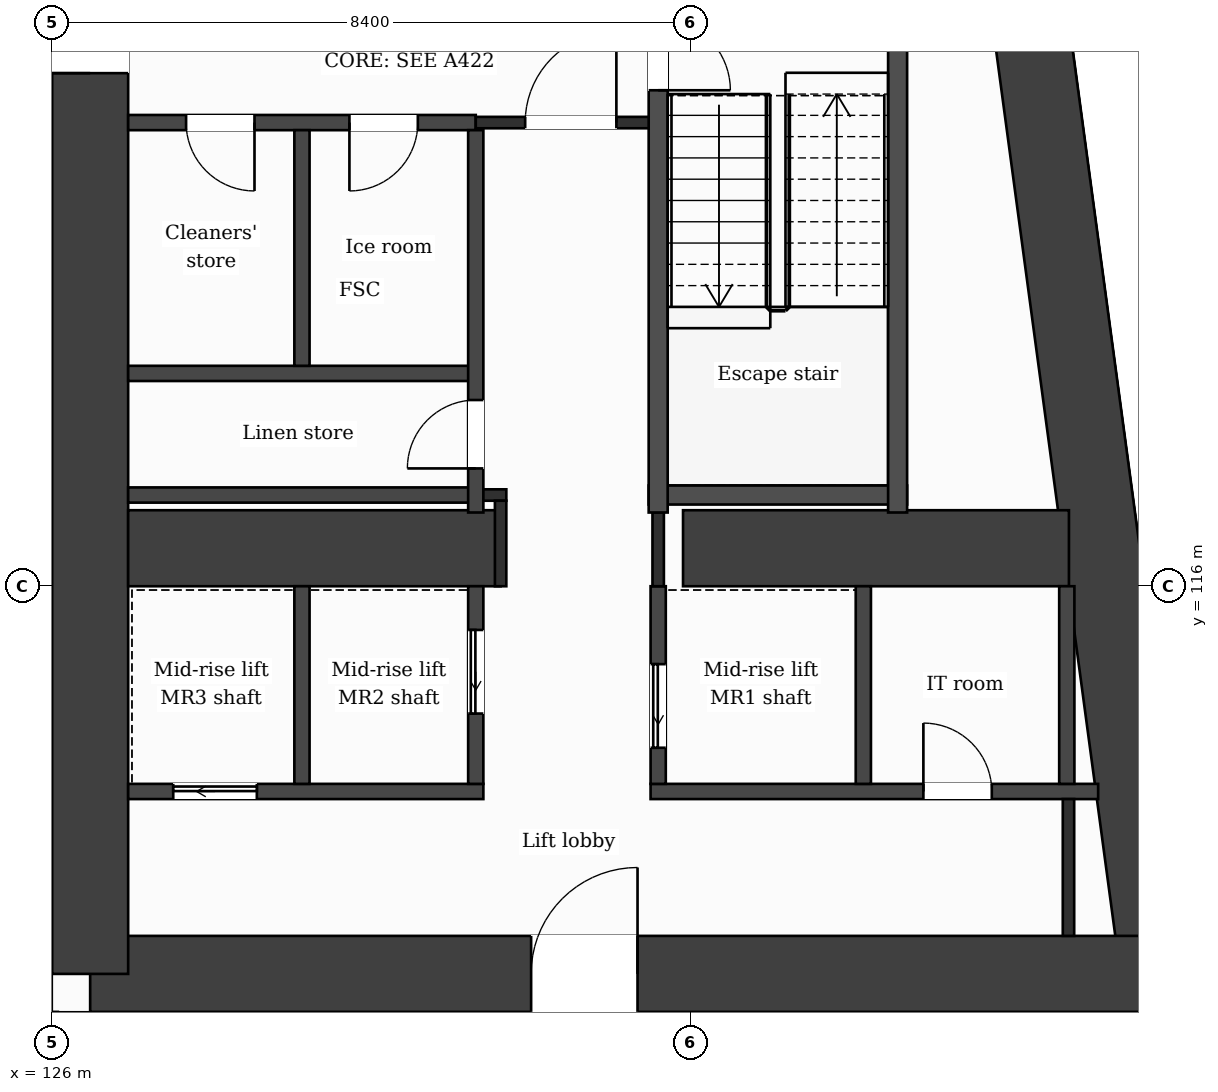
"""IFC4 building model, lengths in metres.
Left out: names, types, materials, properties, quantities, classifications, styles, units other than length and angle.
Written with IfcOpenShell. Run it as: python <this file> out.ifc"""

import sys

from ifc_helpers import new_model, si_unit, direction, frame, frame_2d, origin, place, context, subcontext, project, spatial, rectangle, extrude, element, fill, save


model = new_model("IFC4")
c1 = context("Model", 3, precision=1e-05, world=origin(), true_north=direction((0.0, 1.0)))
c2 = subcontext(c1, "Body", "Model", "MODEL_VIEW")
j1 = project(units=[si_unit("LENGTHUNIT", "METRE"), si_unit("PLANEANGLEUNIT", "RADIAN")], contexts=[c1])
p1 = place(None, origin())
s1 = spatial("IfcSite", under=j1, at=p1, CompositionType="ELEMENT")
p2 = place(p1, origin())
s2 = spatial("IfcBuilding", under=s1, at=p2, CompositionType="ELEMENT")
p3 = place(p2, frame((0.0, 0.0, 94.7)))
s3 = spatial("IfcBuildingStorey", under=s2, at=p3, CompositionType="ELEMENT", Elevation=94.7)
p4 = place(p3, frame((137.732, 131.9, 0.0), z_axis=(0.0, 0.0, 1.0), x_axis=(0.133411141623, -0.991060778808, 0.0)))
e1 = element("IfcWall", 1, at=p4, inside=s3, PredefinedType="SHEAR", context=c2, shape_type="SweptSolid", body=[
    extrude(rectangle(XDim=21.189, YDim=1.0, at=frame_2d((10.595, 0.0))), origin(), (0.0, 0.0, 1.0), 3.7),
])
p5 = place(p3, frame((140.559, 110.9, 0.0), z_axis=(0.0, 0.0, 1.0), x_axis=(-1.0, 0.0, 0.0)))
e2 = element("IfcWall", 2, at=p5, inside=s3, PredefinedType="SHEAR", context=c2, shape_type="SweptSolid", body=[
    extrude(rectangle(XDim=14.059, YDim=1.0, at=frame_2d((7.029, 0.0))), origin(), (0.0, 0.0, 1.0), 3.7),
])
p6 = place(p5, frame((6.858, 0.0, 0.0)))
e3 = element("IfcOpeningElement", 3, at=p6, cuts=e2, PredefinedType="OPENING", context=c2, shape_type="SweptSolid", body=[
    extrude(rectangle(XDim=1.4, YDim=2.1, at=frame_2d((0.7, 1.05))), frame((0.0, 0.51, 0.0), z_axis=(0.0, -1.0, 0.0), x_axis=(1.0, 0.0, 0.0)), (0.0, 0.0, 1.0), 1.02),
])
p7 = place(p3, frame((126.5, 110.9, 0.0), z_axis=(0.0, 0.0, 1.0), x_axis=(0.0, 1.0, 0.0)))
e4 = element("IfcWall", 4, at=p7, inside=s3, PredefinedType="SHEAR", context=c2, shape_type="SweptSolid", body=[
    extrude(rectangle(XDim=21.0, YDim=1.0, at=frame_2d((10.5, 0.0))), origin(), (0.0, 0.0, 1.0), 3.7),
])
p8 = place(p7, frame((11.85, 0.0, 0.0)))
e5 = element("IfcOpeningElement", 5, at=p8, cuts=e4, PredefinedType="OPENING", context=c2, shape_type="SweptSolid", body=[
    extrude(rectangle(XDim=1.4, YDim=2.1, at=frame_2d((0.7, 1.05))), frame((0.0, 0.51, 0.0), z_axis=(0.0, -1.0, 0.0), x_axis=(1.0, 0.0, 0.0)), (0.0, 0.0, 1.0), 1.02),
])
p9 = place(p3, frame((127.0, 116.5, 0.0), z_axis=(0.0, 0.0, 1.0), x_axis=(1.0, 0.0, 0.0)))
e6 = element("IfcWall", 6, at=p9, inside=s3, PredefinedType="SHEAR", context=c2, shape_type="SweptSolid", body=[
    extrude(rectangle(XDim=4.9, YDim=1.0, at=frame_2d((2.45, 0.0))), origin(), (0.0, 0.0, 1.0), 3.7),
])
p10 = place(p3, frame((134.3, 116.5, 0.0), z_axis=(0.0, 0.0, 1.0), x_axis=(1.0, 0.0, 0.0)))
e7 = element("IfcWall", 7, at=p10, inside=s3, PredefinedType="SHEAR", context=c2, shape_type="SweptSolid", body=[
    extrude(rectangle(XDim=5.077, YDim=1.0, at=frame_2d((2.539, 0.0))), origin(), (0.0, 0.0, 1.0), 3.7),
])
p11 = place(p3, frame((140.348, 103.85, 0.0), z_axis=(0.0, 0.0, 1.0), x_axis=(-0.133431549479, 0.991058031401, 0.0)))
e8 = element("IfcWall", 8, at=p11, inside=s3, PredefinedType="SOLIDWALL", context=c2, shape_type="SweptSolid", body=[
    extrude(rectangle(XDim=6.609, YDim=0.3, at=frame_2d((3.304, 0.0))), origin(), (0.0, 0.0, 1.0), 3.38),
])
p12 = place(p11, frame((0.737, 0.0, 0.9)))
e9 = element("IfcOpeningElement", 9, at=p12, cuts=e8, PredefinedType="OPENING", context=c2, shape_type="SweptSolid", body=[
    extrude(rectangle(XDim=1.2, YDim=2.1, at=frame_2d((0.6, 1.05))), frame((0.0, 0.16, 0.0), z_axis=(0.0, -1.0, 0.0), x_axis=(1.0, 0.0, 0.0)), (0.0, 0.0, 1.0), 0.32),
])
p13 = place(p11, frame((3.991, 0.0, 0.0)))
e10 = element("IfcOpeningElement", 10, at=p13, cuts=e8, PredefinedType="OPENING", context=c2, shape_type="SweptSolid", body=[
    extrude(rectangle(XDim=1.2, YDim=2.4, at=frame_2d((0.6, 1.2))), frame((0.0, 0.16, 0.0), z_axis=(0.0, -1.0, 0.0), x_axis=(1.0, 0.0, 0.0)), (0.0, 0.0, 1.0), 0.32),
])
p14 = place(p3, frame((127.0, 113.3, 0.0), z_axis=(0.0, 0.0, 1.0), x_axis=(1.0, 0.0, 0.0)))
e11 = element("IfcWall", 11, at=p14, inside=s3, PredefinedType="PARTITIONING", context=c2, shape_type="SweptSolid", body=[
    extrude(rectangle(XDim=4.673, YDim=0.2, at=frame_2d((2.336, 0.0))), origin(), (0.0, 0.0, 1.0), 3.38),
])
p15 = place(p14, frame((0.593, 0.0, 0.0)))
e12 = element("IfcOpeningElement", 12, at=p15, cuts=e11, PredefinedType="OPENING", context=c2, shape_type="SweptSolid", body=[
    extrude(rectangle(XDim=1.1, YDim=2.1, at=frame_2d((0.55, 1.05))), frame((0.0, 0.11, 0.0), z_axis=(0.0, -1.0, 0.0), x_axis=(1.0, 0.0, 0.0)), (0.0, 0.0, 1.0), 0.22),
])
p16 = place(p3, frame((133.873, 113.3, 0.0), z_axis=(0.0, 0.0, 1.0), x_axis=(1.0, 0.0, 0.0)))
e13 = element("IfcWall", 13, at=p16, inside=s3, PredefinedType="PARTITIONING", context=c2, shape_type="SweptSolid", body=[
    extrude(rectangle(XDim=5.888, YDim=0.2, at=frame_2d((2.944, 0.0))), origin(), (0.0, 0.0, 1.0), 3.38),
])
p17 = place(p16, frame((3.589, 0.0, 0.0)))
e14 = element("IfcOpeningElement", 14, at=p17, cuts=e13, PredefinedType="OPENING", context=c2, shape_type="SweptSolid", body=[
    extrude(rectangle(XDim=0.9, YDim=2.1, at=frame_2d((0.45, 1.05))), frame((0.0, 0.11, 0.0), z_axis=(0.0, -1.0, 0.0), x_axis=(1.0, 0.0, 0.0)), (0.0, 0.0, 1.0), 0.22),
])
p18 = place(p3, frame((127.0, 117.2, 0.0), z_axis=(0.0, 0.0, 1.0), x_axis=(1.0, 0.0, 0.0)))
e15 = element("IfcWall", 15, at=p18, inside=s3, PredefinedType="PARTITIONING", context=c2, shape_type="SweptSolid", body=[
    extrude(rectangle(XDim=4.573, YDim=0.2, at=frame_2d((2.287, 0.0))), origin(), (0.0, 0.0, 1.0), 3.38),
])
p19 = place(p3, frame((131.573, 117.2, 0.0), z_axis=(0.0, 0.0, 1.0), x_axis=(1.0, 0.0, 0.0)))
e16 = element("IfcWall", 16, at=p19, inside=s3, PredefinedType="PARTITIONING", context=c2, shape_type="SweptSolid", body=[
    extrude(rectangle(XDim=0.402, YDim=0.15, at=frame_2d((0.201, 0.0))), origin(), (0.0, 0.0, 1.0), 3.38),
])
p20 = place(p3, frame((133.848, 117.2, 0.0), z_axis=(0.0, 0.0, 1.0), x_axis=(1.0, 0.0, 0.0)))
e17 = element("IfcWall", 17, at=p20, inside=s3, PredefinedType="PARTITIONING", context=c2, shape_type="SweptSolid", body=[
    extrude(rectangle(XDim=3.4, YDim=0.25, at=frame_2d((1.7, 0.0))), origin(), (0.0, 0.0, 1.0), 3.38),
])
p21 = place(p3, frame((127.0, 118.8, 0.0), z_axis=(0.0, 0.0, 1.0), x_axis=(1.0, 0.0, 0.0)))
e18 = element("IfcWall", 18, at=p21, inside=s3, PredefinedType="PARTITIONING", context=c2, shape_type="SweptSolid", body=[
    extrude(rectangle(XDim=4.573, YDim=0.2, at=frame_2d((2.287, 0.0))), origin(), (0.0, 0.0, 1.0), 3.38),
])
p22 = place(p3, frame((127.0, 122.1, 0.0), z_axis=(0.0, 0.0, 1.0), x_axis=(1.0, 0.0, 0.0)))
e19 = element("IfcWall", 19, at=p22, inside=s3, PredefinedType="PARTITIONING", context=c2, shape_type="SweptSolid", body=[
    extrude(rectangle(XDim=4.573, YDim=0.2, at=frame_2d((2.287, 0.0))), origin(), (0.0, 0.0, 1.0), 3.38),
])
p23 = place(p22, frame((2.911, 0.0, 0.0)))
e20 = element("IfcOpeningElement", 20, at=p23, cuts=e19, PredefinedType="OPENING", context=c2, shape_type="SweptSolid", body=[
    extrude(rectangle(XDim=0.9, YDim=2.1, at=frame_2d((0.45, 1.05))), frame((0.0, 0.11, 0.0), z_axis=(0.0, -1.0, 0.0), x_axis=(1.0, 0.0, 0.0)), (0.0, 0.0, 1.0), 0.22),
])
p24 = place(p22, frame((0.762, 0.0, 0.0)))
e21 = element("IfcOpeningElement", 21, at=p24, cuts=e19, PredefinedType="OPENING", context=c2, shape_type="SweptSolid", body=[
    extrude(rectangle(XDim=0.9, YDim=2.1, at=frame_2d((0.45, 1.05))), frame((0.0, 0.11, 0.0), z_axis=(0.0, -1.0, 0.0), x_axis=(1.0, 0.0, 0.0)), (0.0, 0.0, 1.0), 0.22),
])
p25 = place(p3, frame((131.573, 122.1, 0.0), z_axis=(0.0, 0.0, 1.0), x_axis=(1.0, 0.0, 0.0)))
e22 = element("IfcWall", 22, at=p25, inside=s3, PredefinedType="PARTITIONING", context=c2, shape_type="SweptSolid", body=[
    extrude(rectangle(XDim=2.4, YDim=0.15, at=frame_2d((1.2, 0.0))), origin(), (0.0, 0.0, 1.0), 3.38),
])
p26 = place(p25, frame((0.65, 0.0, 0.0)))
e23 = element("IfcOpeningElement", 23, at=p26, cuts=e22, PredefinedType="OPENING", context=c2, shape_type="SweptSolid", body=[
    extrude(rectangle(XDim=1.2, YDim=2.1, at=frame_2d((0.6, 1.05))), frame((0.0, 0.085, 0.0), z_axis=(0.0, -1.0, 0.0), x_axis=(1.0, 0.0, 0.0)), (0.0, 0.0, 1.0), 0.17),
])
p27 = place(p3, frame((100.8, 122.45, 0.0), z_axis=(0.0, 0.0, 1.0), x_axis=(1.0, 0.0, 0.0)))
e24 = element("IfcWall", 24, at=p27, inside=s3, PredefinedType="PARTITIONING", context=c2, shape_type="SweptSolid", body=[
    extrude(rectangle(XDim=25.2, YDim=0.15, at=frame_2d((12.6, 0.0))), origin(), (0.0, 0.0, 1.0), 3.38),
])
p28 = place(p3, frame((126.0, 109.075, 0.0), z_axis=(0.0, 0.0, 1.0), x_axis=(0.0, 1.0, 0.0)))
e25 = element("IfcWall", 25, at=p28, inside=s3, PredefinedType="PARTITIONING", context=c2, shape_type="SweptSolid", body=[
    extrude(rectangle(XDim=1.325, YDim=0.15, at=frame_2d((0.663, 0.0))), origin(), (0.0, 0.0, 1.0), 3.38),
])
p29 = place(p3, frame((129.287, 113.4, 0.0), z_axis=(0.0, 0.0, 1.0), x_axis=(0.0, 1.0, 0.0)))
e26 = element("IfcWall", 26, at=p29, inside=s3, PredefinedType="PARTITIONING", context=c2, shape_type="SweptSolid", body=[
    extrude(rectangle(XDim=2.6, YDim=0.2, at=frame_2d((1.3, 0.0))), origin(), (0.0, 0.0, 1.0), 3.38),
])
p30 = place(p3, frame((129.287, 118.9, 0.0), z_axis=(0.0, 0.0, 1.0), x_axis=(0.0, 1.0, 0.0)))
e27 = element("IfcWall", 27, at=p30, inside=s3, PredefinedType="PARTITIONING", context=c2, shape_type="SweptSolid", body=[
    extrude(rectangle(XDim=3.1, YDim=0.2, at=frame_2d((1.55, 0.0))), origin(), (0.0, 0.0, 1.0), 3.38),
])
p31 = place(p3, frame((131.573, 113.4, 0.0), z_axis=(0.0, 0.0, 1.0), x_axis=(0.0, 1.0, 0.0)))
e28 = element("IfcWall", 28, at=p31, inside=s3, PredefinedType="PARTITIONING", context=c2, shape_type="SweptSolid", body=[
    extrude(rectangle(XDim=2.6, YDim=0.2, at=frame_2d((1.3, 0.0))), origin(), (0.0, 0.0, 1.0), 3.38),
])
p32 = place(p31, frame((0.925, 0.0, 0.0)))
e29 = element("IfcOpeningElement", 29, at=p32, cuts=e28, PredefinedType="OPENING", context=c2, shape_type="SweptSolid", body=[
    extrude(rectangle(XDim=1.1, YDim=2.1, at=frame_2d((0.55, 1.05))), frame((0.0, 0.11, 0.0), z_axis=(0.0, -1.0, 0.0), x_axis=(1.0, 0.0, 0.0)), (0.0, 0.0, 1.0), 0.22),
])
p33 = place(p3, frame((131.573, 116.97, 0.0), z_axis=(0.0, 0.0, 1.0), x_axis=(0.0, 1.0, 0.0)))
e30 = element("IfcWall", 30, at=p33, inside=s3, PredefinedType="PARTITIONING", context=c2, shape_type="SweptSolid", body=[
    extrude(rectangle(XDim=5.03, YDim=0.2, at=frame_2d((2.515, 0.0))), origin(), (0.0, 0.0, 1.0), 3.38),
])
p34 = place(p33, frame((0.58, 0.0, 0.0)))
e31 = element("IfcOpeningElement", 31, at=p34, cuts=e30, PredefinedType="OPENING", context=c2, shape_type="SweptSolid", body=[
    extrude(rectangle(XDim=0.9, YDim=2.1, at=frame_2d((0.45, 1.05))), frame((0.0, 0.11, 0.0), z_axis=(0.0, -1.0, 0.0), x_axis=(1.0, 0.0, 0.0)), (0.0, 0.0, 1.0), 0.22),
])
p35 = place(p3, frame((131.9, 116.0, 0.0), z_axis=(0.0, 0.0, 1.0), x_axis=(0.0, 1.0, 0.0)))
e32 = element("IfcWall", 32, at=p35, inside=s3, PredefinedType="PARTITIONING", context=c2, shape_type="SweptSolid", body=[
    extrude(rectangle(XDim=1.125, YDim=0.15, at=frame_2d((0.562, 0.0))), origin(), (0.0, 0.0, 1.0), 3.38),
])
p36 = place(p3, frame((133.973, 113.4, 0.0), z_axis=(0.0, 0.0, 1.0), x_axis=(0.0, 1.0, 0.0)))
e33 = element("IfcWall", 33, at=p36, inside=s3, PredefinedType="PARTITIONING", context=c2, shape_type="SweptSolid", body=[
    extrude(rectangle(XDim=2.6, YDim=0.2, at=frame_2d((1.3, 0.0))), origin(), (0.0, 0.0, 1.0), 3.38),
])
p37 = place(p36, frame((0.475, 0.0, 0.0)))
e34 = element("IfcOpeningElement", 34, at=p37, cuts=e33, PredefinedType="OPENING", context=c2, shape_type="SweptSolid", body=[
    extrude(rectangle(XDim=1.1, YDim=2.1, at=frame_2d((0.55, 1.05))), frame((0.0, 0.11, 0.0), z_axis=(0.0, -1.0, 0.0), x_axis=(1.0, 0.0, 0.0)), (0.0, 0.0, 1.0), 0.22),
])
p38 = place(p3, frame((133.973, 116.0, 0.0), z_axis=(0.0, 0.0, 1.0), x_axis=(0.0, 1.0, 0.0)))
e35 = element("IfcWall", 35, at=p38, inside=s3, PredefinedType="PARTITIONING", context=c2, shape_type="SweptSolid", body=[
    extrude(rectangle(XDim=0.97, YDim=0.15, at=frame_2d((0.485, 0.0))), origin(), (0.0, 0.0, 1.0), 3.38),
])
p39 = place(p3, frame((133.973, 116.97, 0.0), z_axis=(0.0, 0.0, 1.0), x_axis=(0.0, 1.0, 0.0)))
e36 = element("IfcWall", 36, at=p39, inside=s3, PredefinedType="PARTITIONING", context=c2, shape_type="SweptSolid", body=[
    extrude(rectangle(XDim=6.855, YDim=0.25, at=frame_2d((3.427, 0.0))), origin(), (0.0, 0.0, 1.0), 3.38),
])
p40 = place(p39, frame((5.555, 0.0, 0.0)))
e37 = element("IfcOpeningElement", 37, at=p40, cuts=e36, PredefinedType="OPENING", context=c2, shape_type="SweptSolid", body=[
    extrude(rectangle(XDim=0.95, YDim=2.1, at=frame_2d((0.475, 1.05))), frame((0.0, 0.135, 0.0), z_axis=(0.0, -1.0, 0.0), x_axis=(1.0, 0.0, 0.0)), (0.0, 0.0, 1.0), 0.27),
])
p41 = place(p3, frame((136.672, 113.4, 0.0), z_axis=(0.0, 0.0, 1.0), x_axis=(0.0, 1.0, 0.0)))
e38 = element("IfcWall", 38, at=p41, inside=s3, PredefinedType="PARTITIONING", context=c2, shape_type="SweptSolid", body=[
    extrude(rectangle(XDim=2.6, YDim=0.2, at=frame_2d((1.3, 0.0))), origin(), (0.0, 0.0, 1.0), 3.38),
])
p42 = place(p3, frame((137.123, 116.97, 0.0), z_axis=(0.0, 0.0, 1.0), x_axis=(0.0, 1.0, 0.0)))
e39 = element("IfcWall", 39, at=p42, inside=s3, PredefinedType="PARTITIONING", context=c2, shape_type="SweptSolid", body=[
    extrude(rectangle(XDim=6.855, YDim=0.25, at=frame_2d((3.427, 0.0))), origin(), (0.0, 0.0, 1.0), 3.38),
])
p43 = place(p3, frame((139.349, 113.4, 0.0), z_axis=(0.0, 0.0, 1.0), x_axis=(0.0, 1.0, 0.0)))
e40 = element("IfcWall", 40, at=p43, inside=s3, PredefinedType="PARTITIONING", context=c2, shape_type="SweptSolid", body=[
    extrude(rectangle(XDim=2.6, YDim=0.2, at=frame_2d((1.3, 0.0))), origin(), (0.0, 0.0, 1.0), 3.38),
])
p44 = place(p3, frame((139.371, 111.4, 0.0), z_axis=(0.0, 0.0, 1.0), x_axis=(0.0, 1.0, 0.0)))
e41 = element("IfcWall", 41, at=p44, inside=s3, PredefinedType="PARTITIONING", context=c2, shape_type="SweptSolid", body=[
    extrude(rectangle(XDim=1.8, YDim=0.15, at=frame_2d((0.9, 0.0))), origin(), (0.0, 0.0, 1.0), 3.38),
])
p45 = place(p26, origin())
e42 = element("IfcDoor", 42, at=p45, inside=s3, OperationType="SINGLE_SWING_RIGHT", PredefinedType="DOOR", context=c2, shape_type="SweptSolid", body=[
    extrude(rectangle(XDim=1.2, YDim=2.1, at=frame_2d((0.6, 1.05))), frame((0.0, 0.025, 0.0), z_axis=(0.0, -1.0, 0.0), x_axis=(1.0, 0.0, 0.0)), (0.0, 0.0, 1.0), 0.05),
])
fill(e23, e42)
p46 = place(p23, origin())
e43 = element("IfcDoor", 43, at=p46, inside=s3, OperationType="SINGLE_SWING_LEFT", PredefinedType="DOOR", context=c2, shape_type="SweptSolid", body=[
    extrude(rectangle(XDim=0.9, YDim=2.1, at=frame_2d((0.45, 1.05))), frame((0.0, 0.025, 0.0), z_axis=(0.0, -1.0, 0.0), x_axis=(1.0, 0.0, 0.0)), (0.0, 0.0, 1.0), 0.05),
])
fill(e20, e43)
p47 = place(p24, origin())
e44 = element("IfcDoor", 44, at=p47, inside=s3, OperationType="SINGLE_SWING_RIGHT", PredefinedType="DOOR", context=c2, shape_type="SweptSolid", body=[
    extrude(rectangle(XDim=0.9, YDim=2.1, at=frame_2d((0.45, 1.05))), frame((0.0, 0.025, 0.0), z_axis=(0.0, -1.0, 0.0), x_axis=(1.0, 0.0, 0.0)), (0.0, 0.0, 1.0), 0.05),
])
fill(e21, e44)
p48 = place(p40, origin())
e45 = element("IfcDoor", 45, at=p48, inside=s3, OperationType="SINGLE_SWING_LEFT", PredefinedType="DOOR", context=c2, shape_type="SweptSolid", body=[
    extrude(rectangle(XDim=0.95, YDim=2.1, at=frame_2d((0.475, 1.05))), frame((0.0, 0.025, 0.0), z_axis=(0.0, -1.0, 0.0), x_axis=(1.0, 0.0, 0.0)), (0.0, 0.0, 1.0), 0.05),
])
fill(e37, e45)
p49 = place(p34, origin())
e46 = element("IfcDoor", 46, at=p49, inside=s3, OperationType="SINGLE_SWING_LEFT", PredefinedType="DOOR", context=c2, shape_type="SweptSolid", body=[
    extrude(rectangle(XDim=0.9, YDim=2.1, at=frame_2d((0.45, 1.05))), frame((0.0, 0.025, 0.0), z_axis=(0.0, -1.0, 0.0), x_axis=(1.0, 0.0, 0.0)), (0.0, 0.0, 1.0), 0.05),
])
fill(e31, e46)
p50 = place(p37, origin())
e47 = element("IfcDoor", 47, at=p50, inside=s3, OperationType="SLIDING_TO_LEFT", PredefinedType="DOOR", context=c2, shape_type="SweptSolid", body=[
    extrude(rectangle(XDim=1.1, YDim=2.1, at=frame_2d((0.55, 1.05))), frame((0.0, 0.025, 0.0), z_axis=(0.0, -1.0, 0.0), x_axis=(1.0, 0.0, 0.0)), (0.0, 0.0, 1.0), 0.05),
])
fill(e34, e47)
p51 = place(p32, origin())
e48 = element("IfcDoor", 48, at=p51, inside=s3, OperationType="SLIDING_TO_LEFT", PredefinedType="DOOR", context=c2, shape_type="SweptSolid", body=[
    extrude(rectangle(XDim=1.1, YDim=2.1, at=frame_2d((0.55, 1.05))), frame((0.0, 0.025, 0.0), z_axis=(0.0, -1.0, 0.0), x_axis=(1.0, 0.0, 0.0)), (0.0, 0.0, 1.0), 0.05),
])
fill(e29, e48)
p52 = place(p15, origin())
e49 = element("IfcDoor", 49, at=p52, inside=s3, OperationType="SLIDING_TO_LEFT", PredefinedType="DOOR", context=c2, shape_type="SweptSolid", body=[
    extrude(rectangle(XDim=1.1, YDim=2.1, at=frame_2d((0.55, 1.05))), frame((0.0, 0.025, 0.0), z_axis=(0.0, -1.0, 0.0), x_axis=(1.0, 0.0, 0.0)), (0.0, 0.0, 1.0), 0.05),
])
fill(e12, e49)
p53 = place(p17, origin())
e50 = element("IfcDoor", 50, at=p53, inside=s3, OperationType="SINGLE_SWING_LEFT", PredefinedType="DOOR", context=c2, shape_type="SweptSolid", body=[
    extrude(rectangle(XDim=0.9, YDim=2.1, at=frame_2d((0.45, 1.05))), frame((0.0, 0.025, 0.0), z_axis=(0.0, -1.0, 0.0), x_axis=(1.0, 0.0, 0.0)), (0.0, 0.0, 1.0), 0.05),
])
fill(e14, e50)
p54 = place(p6, origin())
e51 = element("IfcDoor", 51, at=p54, inside=s3, OperationType="SINGLE_SWING_LEFT", PredefinedType="DOOR", context=c2, shape_type="SweptSolid", body=[
    extrude(rectangle(XDim=1.4, YDim=2.1, at=frame_2d((0.7, 1.05))), frame((0.0, 0.025, 0.0), z_axis=(0.0, -1.0, 0.0), x_axis=(1.0, 0.0, 0.0)), (0.0, 0.0, 1.0), 0.05),
])
fill(e3, e51)
p55 = place(p8, origin())
e52 = element("IfcDoor", 52, at=p55, inside=s3, OperationType="SINGLE_SWING_LEFT", PredefinedType="DOOR", context=c2, shape_type="SweptSolid", body=[
    extrude(rectangle(XDim=1.4, YDim=2.1, at=frame_2d((0.7, 1.05))), frame((0.0, 0.025, 0.0), z_axis=(0.0, -1.0, 0.0), x_axis=(1.0, 0.0, 0.0)), (0.0, 0.0, 1.0), 0.05),
])
fill(e5, e52)
save(model, sys.argv[1])
